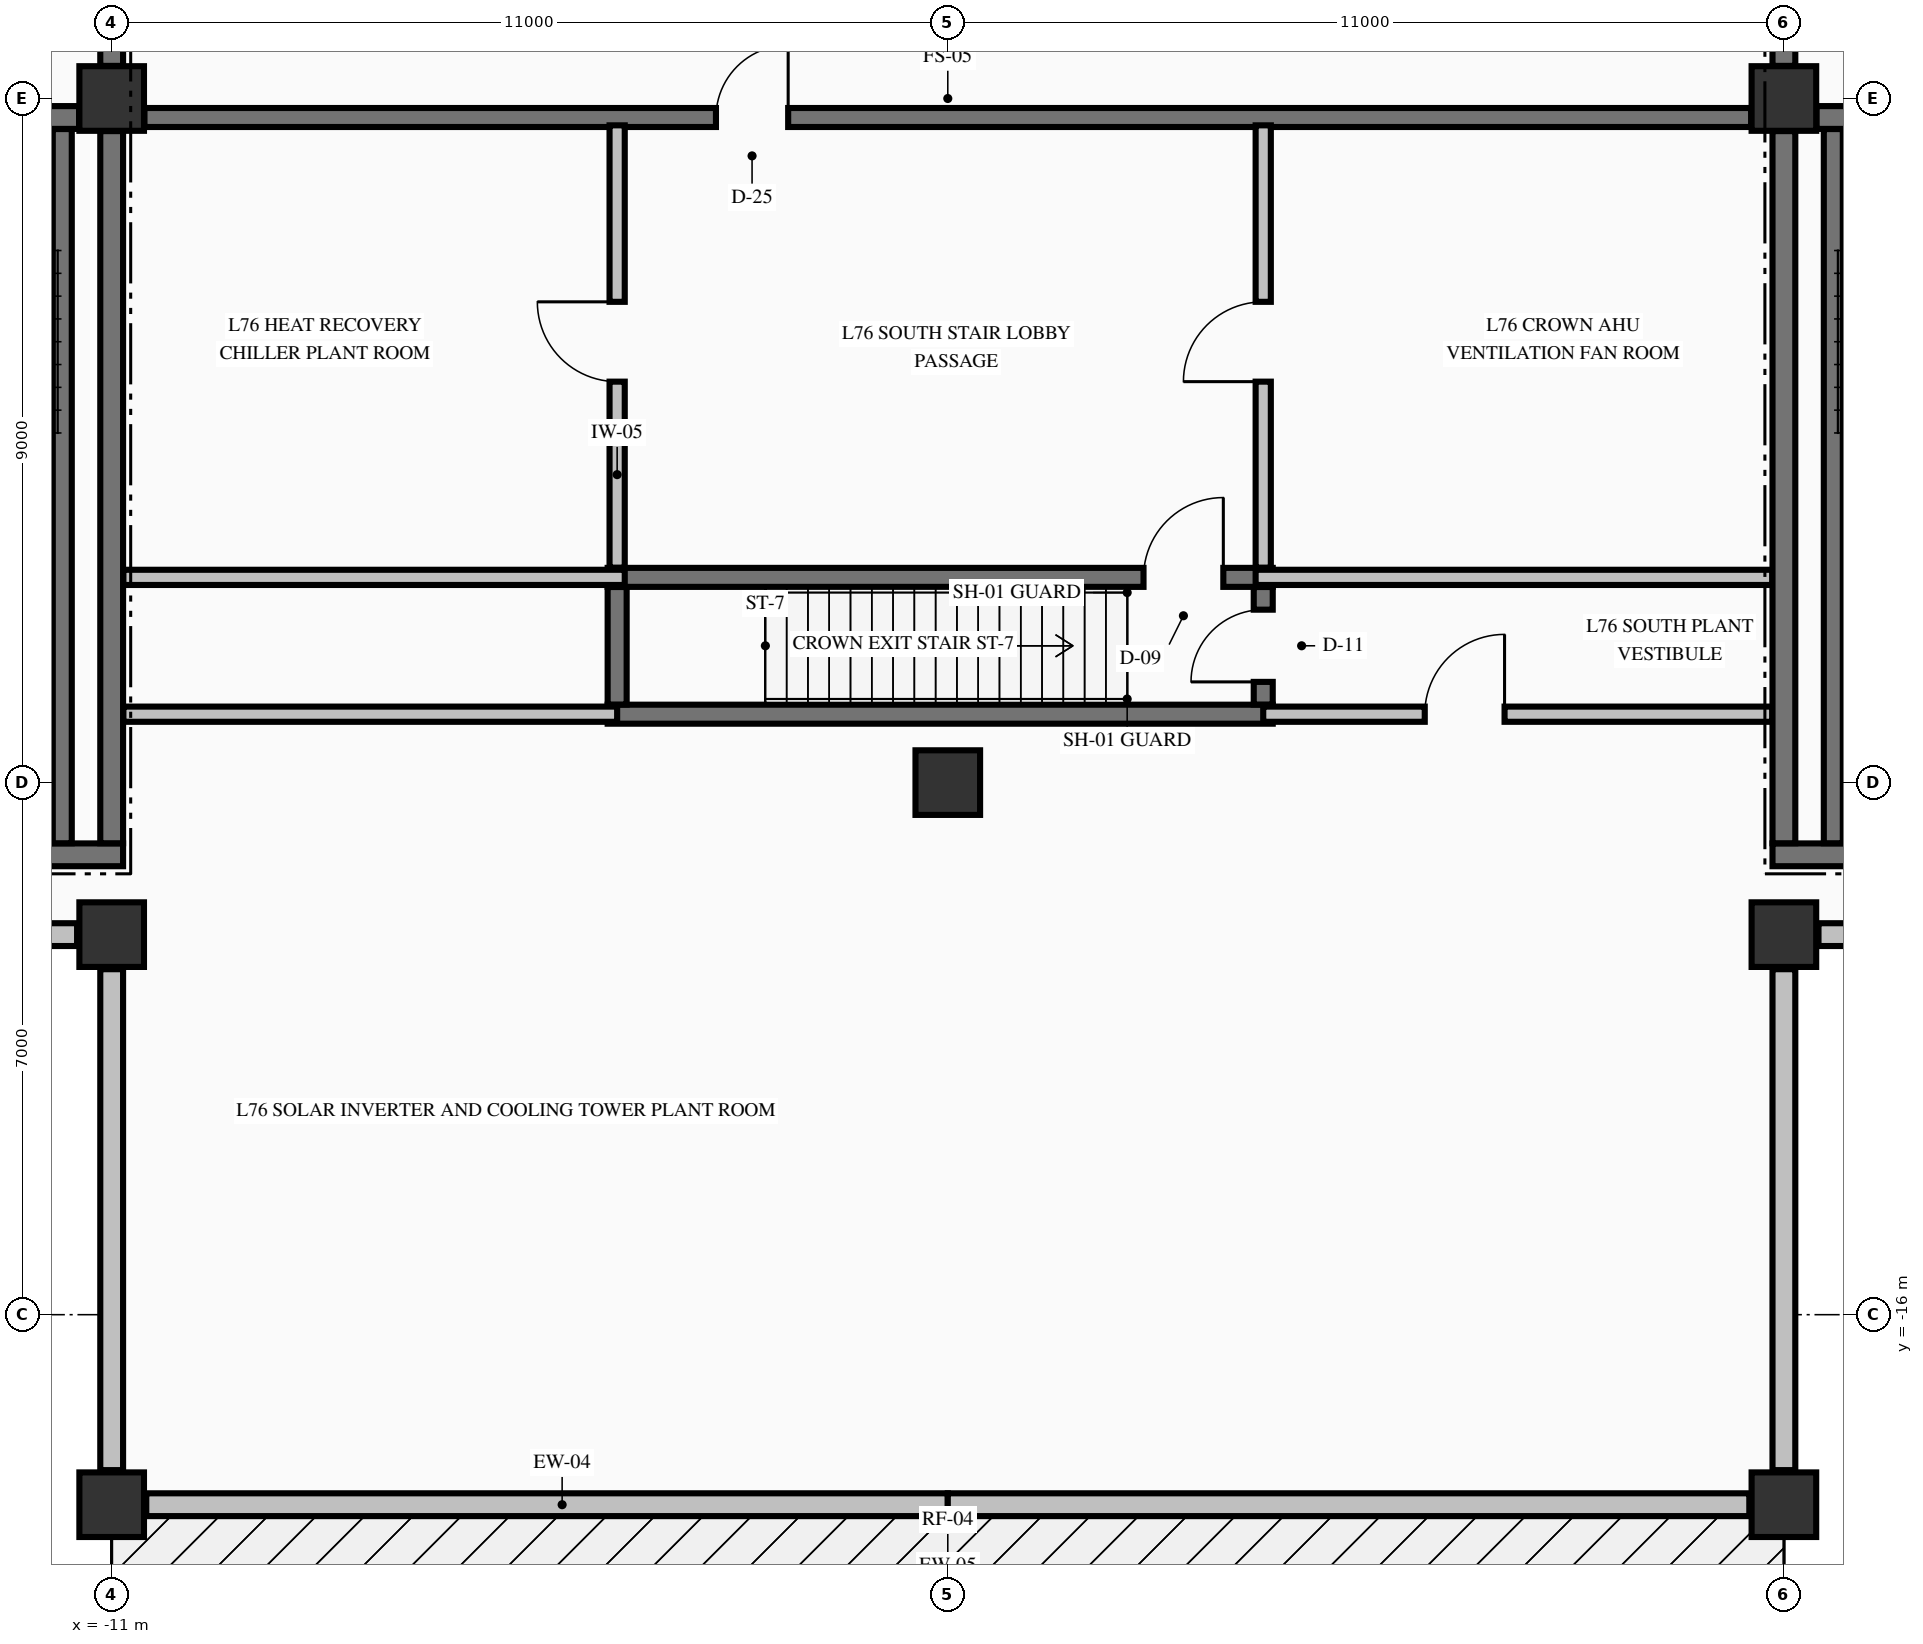
"""IFC4 building model, lengths in metres.
Left out: names, types, materials, properties, quantities, classifications, styles, units other than length and angle.
Written with IfcOpenShell. Run it as: python <this file> out.ifc"""

import sys

from ifc_helpers import new_model, si_unit, direction, frame, frame_2d, origin, origin_2d, place, context, subcontext, project, spatial, rectangle, extrude, element, fill, save


model = new_model("IFC4")
c1 = context("Model", 3, precision=1e-05, world=origin(), true_north=direction((0.0, 1.0)))
c2 = subcontext(c1, "Body", "Model", "MODEL_VIEW")
j1 = project(units=[si_unit("LENGTHUNIT", "METRE"), si_unit("PLANEANGLEUNIT", "RADIAN")], contexts=[c1])
p1 = place(None, origin())
s1 = spatial("IfcSite", under=j1, at=p1, CompositionType="ELEMENT")
p2 = place(p1, origin())
s2 = spatial("IfcBuilding", under=s1, at=p2, CompositionType="ELEMENT")
p3 = place(p2, frame((0.0, 0.0, 284.86)))
s3 = spatial("IfcBuildingStorey", under=s2, at=p3, CompositionType="ELEMENT", Elevation=284.86)
for number, where, z_axis, x_axis in (
    (1, (-11.0, -18.5, -0.325), (0.0, 0.0, 1.0), (1.0, 0.0, 0.0)),
    (2, (11.0, -18.5, -0.325), (0.0, 0.0, 1.0), (1.0, 0.0, 0.0)),
    (3, (-11.0, -11.0, -0.325), (0.0, 0.0, 1.0), (1.0, 0.0, 0.0)),
    (4, (11.0, -11.0, -0.325), (0.0, 0.0, 1.0), (1.0, 0.0, 0.0)),
    (5, (-11.0, 0.0, -0.325), (0.0, 0.0, 1.0), (1.0, 0.0, 0.0)),
    (6, (11.0, 0.0, -0.325), (0.0, 0.0, 1.0), (1.0, 0.0, 0.0)),
    (7, (0.0, -9.0, -0.325), (0.0, 0.0, 1.0), (1.0, 0.0, 0.0)),
):
    element("IfcColumn", number, at=place(p3, frame(where, z_axis=z_axis, x_axis=x_axis)), inside=s3, PredefinedType="COLUMN", context=c2, shape_type="SweptSolid", body=[
        extrude(rectangle(XDim=0.85, YDim=0.85, at=origin_2d()), origin(), (0.0, 0.0, 1.0), 3.06),
    ])
for number, where, z_axis, x_axis in (
    (8, (-10.545, -18.5, 0.0), (0.0, 0.0, 1.0), (1.0, 0.0, 0.0)),
    (9, (0.0, -18.5, 0.0), (0.0, 0.0, 1.0), (1.0, 0.0, 0.0)),
):
    element("IfcWall", number, at=place(p3, frame(where, z_axis=z_axis, x_axis=x_axis)), inside=s3, PredefinedType="STANDARD", context=c2, shape_type="SweptSolid", body=[
        extrude(rectangle(XDim=10.545, YDim=0.3, at=frame_2d((5.272, 0.0))), origin(), (0.0, 0.0, 1.0), 2.127),
    ])
p4 = place(p3, frame((11.0, -18.045, 0.0), z_axis=(0.0, 0.0, 1.0), x_axis=(0.0, 1.0, 0.0)))
e10 = element("IfcWall", 10, at=p4, inside=s3, PredefinedType="STANDARD", context=c2, shape_type="SweptSolid", body=[
    extrude(rectangle(XDim=6.59, YDim=0.3, at=frame_2d((3.295, 0.0))), origin(), (0.0, 0.0, 1.0), 0.927),
])
for number, where, z_axis, x_axis in (
    (11, (11.455, -11.0, 0.0), (0.0, 0.0, 1.0), (1.0, 0.0, 0.0)),
    (12, (-18.045, -11.0, 0.0), (0.0, 0.0, 1.0), (1.0, 0.0, 0.0)),
):
    element("IfcWall", number, at=place(p3, frame(where, z_axis=z_axis, x_axis=x_axis)), inside=s3, PredefinedType="STANDARD", context=c2, shape_type="SweptSolid", body=[
        extrude(rectangle(XDim=6.59, YDim=0.3, at=frame_2d((3.295, 0.0))), origin(), (0.0, 0.0, 1.0), 1.077),
    ])
p5 = place(p3, frame((-11.0, -11.455, 0.0), z_axis=(0.0, 0.0, 1.0), x_axis=(0.0, -1.0, 0.0)))
e13 = element("IfcWall", 13, at=p5, inside=s3, PredefinedType="STANDARD", context=c2, shape_type="SweptSolid", body=[
    extrude(rectangle(XDim=6.59, YDim=0.3, at=frame_2d((3.295, 0.0))), origin(), (0.0, 0.0, 1.0), 0.927),
])
for number, where, z_axis, x_axis in (
    (14, (-14.85, -9.95, 0.0), (0.0, 0.0, 1.0), (1.0, 0.0, 0.0)),
    (15, (10.85, -9.95, 0.0), (0.0, 0.0, 1.0), (1.0, 0.0, 0.0)),
):
    element("IfcWall", number, at=place(p3, frame(where, z_axis=z_axis, x_axis=x_axis)), inside=s3, PredefinedType="SHEAR", context=c2, shape_type="SweptSolid", body=[
        extrude(rectangle(XDim=4.0, YDim=0.3, at=frame_2d((2.0, 0.0))), origin(), (0.0, 0.0, 1.0), 2.735),
    ])
p6 = place(p3, frame((-4.475, -8.1, 0.0), z_axis=(0.0, 0.0, 1.0), x_axis=(1.0, 0.0, 0.0)))
e16 = element("IfcWall", 16, at=p6, inside=s3, PredefinedType="SOLIDWALL", context=c2, shape_type="SweptSolid", body=[
    extrude(rectangle(XDim=8.75, YDim=0.25, at=frame_2d((4.375, 0.0))), origin(), (0.0, 0.0, 1.0), 2.735),
])
p7 = place(p3, frame((-4.475, -6.3, 0.0), z_axis=(0.0, 0.0, 1.0), x_axis=(1.0, 0.0, 0.0)))
e17 = element("IfcWall", 17, at=p7, inside=s3, PredefinedType="SOLIDWALL", context=c2, shape_type="SweptSolid", body=[
    extrude(rectangle(XDim=8.75, YDim=0.25, at=frame_2d((4.375, 0.0))), origin(), (0.0, 0.0, 1.0), 2.735),
])
p8 = place(p7, frame((7.05, 0.0, 0.0)))
e18 = element("IfcOpeningElement", 18, at=p8, cuts=e17, PredefinedType="OPENING", context=c2, shape_type="SweptSolid", body=[
    extrude(rectangle(XDim=1.05, YDim=2.15, at=frame_2d((0.525, 1.075))), frame((0.0, 0.135, 0.0), z_axis=(0.0, -1.0, 0.0), x_axis=(1.0, 0.0, 0.0)), (0.0, 0.0, 1.0), 0.27),
])
p9 = place(p3, frame((-14.85, -0.25, 0.0), z_axis=(0.0, 0.0, 1.0), x_axis=(1.0, 0.0, 0.0)))
e19 = element("IfcWall", 19, at=p9, inside=s3, PredefinedType="SHEAR", context=c2, shape_type="SweptSolid", body=[
    extrude(rectangle(XDim=3.421, YDim=0.3, at=frame_2d((1.71, 0.0))), origin(), (0.0, 0.0, 1.0), 2.735),
])
p10 = place(p9, frame((1.15, 0.0, 0.0)))
e20 = element("IfcOpeningElement", 20, at=p10, cuts=e19, PredefinedType="OPENING", context=c2, shape_type="SweptSolid", body=[
    extrude(rectangle(XDim=1.1, YDim=2.15, at=frame_2d((0.55, 1.075))), frame((0.0, 0.16, 0.0), z_axis=(0.0, -1.0, 0.0), x_axis=(1.0, 0.0, 0.0)), (0.0, 0.0, 1.0), 0.32),
])
p11 = place(p3, frame((11.429, -0.25, 0.0), z_axis=(0.0, 0.0, 1.0), x_axis=(1.0, 0.0, 0.0)))
e21 = element("IfcWall", 21, at=p11, inside=s3, PredefinedType="SHEAR", context=c2, shape_type="SweptSolid", body=[
    extrude(rectangle(XDim=3.421, YDim=0.3, at=frame_2d((1.71, 0.0))), origin(), (0.0, 0.0, 1.0), 2.735),
])
p12 = place(p11, frame((1.171, 0.0, 0.0)))
e22 = element("IfcOpeningElement", 22, at=p12, cuts=e21, PredefinedType="OPENING", context=c2, shape_type="SweptSolid", body=[
    extrude(rectangle(XDim=1.1, YDim=2.15, at=frame_2d((0.55, 1.075))), frame((0.0, 0.16, 0.0), z_axis=(0.0, -1.0, 0.0), x_axis=(1.0, 0.0, 0.0)), (0.0, 0.0, 1.0), 0.32),
])
p13 = place(p3, frame((-10.847, -8.1, 0.0), z_axis=(0.0, 0.0, 1.0), x_axis=(1.0, 0.0, 0.0)))
e23 = element("IfcWall", 23, at=p13, inside=s3, PredefinedType="PARTITIONING", context=c2, shape_type="SweptSolid", body=[
    extrude(rectangle(XDim=6.497, YDim=0.2, at=frame_2d((3.249, 0.0))), origin(), (0.0, 0.0, 1.0), 2.735),
])
p14 = place(p3, frame((4.15, -8.1, 0.0), z_axis=(0.0, 0.0, 1.0), x_axis=(1.0, 0.0, 0.0)))
e24 = element("IfcWall", 24, at=p14, inside=s3, PredefinedType="PARTITIONING", context=c2, shape_type="SweptSolid", body=[
    extrude(rectangle(XDim=6.697, YDim=0.2, at=frame_2d((3.349, 0.0))), origin(), (0.0, 0.0, 1.0), 2.735),
])
p15 = place(p14, frame((2.125, 0.0, 0.0)))
e25 = element("IfcOpeningElement", 25, at=p15, cuts=e24, PredefinedType="OPENING", context=c2, shape_type="SweptSolid", body=[
    extrude(rectangle(XDim=1.05, YDim=2.15, at=frame_2d((0.525, 1.075))), frame((0.0, 0.11, 0.0), z_axis=(0.0, -1.0, 0.0), x_axis=(1.0, 0.0, 0.0)), (0.0, 0.0, 1.0), 0.22),
])
p16 = place(p3, frame((-10.847, -6.3, 0.0), z_axis=(0.0, 0.0, 1.0), x_axis=(1.0, 0.0, 0.0)))
e26 = element("IfcWall", 26, at=p16, inside=s3, PredefinedType="PARTITIONING", context=c2, shape_type="SweptSolid", body=[
    extrude(rectangle(XDim=6.597, YDim=0.2, at=frame_2d((3.298, 0.0))), origin(), (0.0, 0.0, 1.0), 2.735),
])
p17 = place(p3, frame((4.05, -6.3, 0.0), z_axis=(0.0, 0.0, 1.0), x_axis=(1.0, 0.0, 0.0)))
e27 = element("IfcWall", 27, at=p17, inside=s3, PredefinedType="PARTITIONING", context=c2, shape_type="SweptSolid", body=[
    extrude(rectangle(XDim=6.797, YDim=0.2, at=frame_2d((3.398, 0.0))), origin(), (0.0, 0.0, 1.0), 2.735),
])
p18 = place(p3, frame((-10.569, -0.25, 0.0), z_axis=(0.0, 0.0, 1.0), x_axis=(1.0, 0.0, 0.0)))
e28 = element("IfcWall", 28, at=p18, inside=s3, PredefinedType="SOLIDWALL", context=c2, shape_type="SweptSolid", body=[
    extrude(rectangle(XDim=21.138, YDim=0.25, at=frame_2d((10.569, 0.0))), origin(), (0.0, 0.0, 1.0), 2.735),
])
p19 = place(p18, frame((7.519, 0.0, 0.0)))
e29 = element("IfcOpeningElement", 29, at=p19, cuts=e28, PredefinedType="OPENING", context=c2, shape_type="SweptSolid", body=[
    extrude(rectangle(XDim=0.95, YDim=2.02, at=frame_2d((0.475, 1.01))), frame((0.0, 0.135, 0.0), z_axis=(0.0, -1.0, 0.0), x_axis=(1.0, 0.0, 0.0)), (0.0, 0.0, 1.0), 0.27),
])
p20 = place(p3, frame((-11.65, -9.798, 0.0), z_axis=(0.0, 0.0, 1.0), x_axis=(0.0, 1.0, 0.0)))
e30 = element("IfcWall", 30, at=p20, inside=s3, PredefinedType="SOLIDWALL", context=c2, shape_type="SweptSolid", body=[
    extrude(rectangle(XDim=9.396, YDim=0.25, at=frame_2d((4.698, 0.0))), origin(), (0.0, 0.0, 1.0), 2.735),
])
p21 = place(p3, frame((-11.0, -9.798, 0.0), z_axis=(0.0, 0.0, 1.0), x_axis=(0.0, 1.0, 0.0)))
e31 = element("IfcWall", 31, at=p21, inside=s3, PredefinedType="SHEAR", context=c2, shape_type="SweptSolid", body=[
    extrude(rectangle(XDim=9.369, YDim=0.3, at=frame_2d((4.685, 0.0))), origin(), (0.0, 0.0, 1.0), 2.735),
])
p22 = place(p3, frame((-11.0, 0.429, 0.0), z_axis=(0.0, 0.0, 1.0), x_axis=(0.0, 1.0, 0.0)))
e32 = element("IfcWall", 32, at=p22, inside=s3, PredefinedType="SHEAR", context=c2, shape_type="SweptSolid", body=[
    extrude(rectangle(XDim=2.319, YDim=0.3, at=frame_2d((1.16, 0.0))), origin(), (0.0, 0.0, 1.0), 2.735),
])
p23 = place(p22, frame((0.671, 0.0, 0.0)))
e33 = element("IfcOpeningElement", 33, at=p23, cuts=e32, PredefinedType="OPENING", context=c2, shape_type="SweptSolid", body=[
    extrude(rectangle(XDim=1.1, YDim=2.15, at=frame_2d((0.55, 1.075))), frame((0.0, 0.16, 0.0), z_axis=(0.0, -1.0, 0.0), x_axis=(1.0, 0.0, 0.0)), (0.0, 0.0, 1.0), 0.32),
])
p24 = place(p3, frame((-4.35, -7.973, 0.0), z_axis=(0.0, 0.0, 1.0), x_axis=(0.0, 1.0, 0.0)))
e34 = element("IfcWall", 34, at=p24, inside=s3, PredefinedType="SOLIDWALL", context=c2, shape_type="SweptSolid", body=[
    extrude(rectangle(XDim=1.546, YDim=0.25, at=frame_2d((0.773, 0.0))), origin(), (0.0, 0.0, 1.0), 2.735),
])
p25 = place(p3, frame((4.15, -7.973, 0.0), z_axis=(0.0, 0.0, 1.0), x_axis=(0.0, 1.0, 0.0)))
e35 = element("IfcWall", 35, at=p25, inside=s3, PredefinedType="SOLIDWALL", context=c2, shape_type="SweptSolid", body=[
    extrude(rectangle(XDim=1.546, YDim=0.25, at=frame_2d((0.773, 0.0))), origin(), (0.0, 0.0, 1.0), 2.735),
])
p26 = place(p25, frame((0.298, 0.0, 0.0)))
e36 = element("IfcOpeningElement", 36, at=p26, cuts=e35, PredefinedType="OPENING", context=c2, shape_type="SweptSolid", body=[
    extrude(rectangle(XDim=0.95, YDim=2.15, at=frame_2d((0.475, 1.075))), frame((0.0, 0.135, 0.0), z_axis=(0.0, -1.0, 0.0), x_axis=(1.0, 0.0, 0.0)), (0.0, 0.0, 1.0), 0.27),
])
p27 = place(p3, frame((11.0, -9.798, 0.0), z_axis=(0.0, 0.0, 1.0), x_axis=(0.0, 1.0, 0.0)))
e37 = element("IfcWall", 37, at=p27, inside=s3, PredefinedType="SHEAR", context=c2, shape_type="SweptSolid", body=[
    extrude(rectangle(XDim=9.369, YDim=0.3, at=frame_2d((4.685, 0.0))), origin(), (0.0, 0.0, 1.0), 2.735),
])
p28 = place(p3, frame((11.0, 0.429, 0.0), z_axis=(0.0, 0.0, 1.0), x_axis=(0.0, 1.0, 0.0)))
e38 = element("IfcWall", 38, at=p28, inside=s3, PredefinedType="SHEAR", context=c2, shape_type="SweptSolid", body=[
    extrude(rectangle(XDim=2.319, YDim=0.3, at=frame_2d((1.16, 0.0))), origin(), (0.0, 0.0, 1.0), 2.735),
])
p29 = place(p28, frame((0.671, 0.0, 0.0)))
e39 = element("IfcOpeningElement", 39, at=p29, cuts=e38, PredefinedType="OPENING", context=c2, shape_type="SweptSolid", body=[
    extrude(rectangle(XDim=1.1, YDim=2.15, at=frame_2d((0.55, 1.075))), frame((0.0, 0.16, 0.0), z_axis=(0.0, -1.0, 0.0), x_axis=(1.0, 0.0, 0.0)), (0.0, 0.0, 1.0), 0.32),
])
p30 = place(p3, frame((11.65, -9.798, 0.0), z_axis=(0.0, 0.0, 1.0), x_axis=(0.0, 1.0, 0.0)))
e40 = element("IfcWall", 40, at=p30, inside=s3, PredefinedType="SOLIDWALL", context=c2, shape_type="SweptSolid", body=[
    extrude(rectangle(XDim=9.396, YDim=0.25, at=frame_2d((4.698, 0.0))), origin(), (0.0, 0.0, 1.0), 2.735),
])
p31 = place(p3, frame((-4.35, -6.172, 0.0), z_axis=(0.0, 0.0, 1.0), x_axis=(0.0, 1.0, 0.0)))
e41 = element("IfcWall", 41, at=p31, inside=s3, PredefinedType="PARTITIONING", context=c2, shape_type="SweptSolid", body=[
    extrude(rectangle(XDim=5.819, YDim=0.2, at=frame_2d((2.91, 0.0))), origin(), (0.0, 0.0, 1.0), 2.735),
])
p32 = place(p31, frame((2.447, 0.0, 0.0)))
e42 = element("IfcOpeningElement", 42, at=p32, cuts=e41, PredefinedType="OPENING", context=c2, shape_type="SweptSolid", body=[
    extrude(rectangle(XDim=1.05, YDim=2.15, at=frame_2d((0.525, 1.075))), frame((0.0, 0.11, 0.0), z_axis=(0.0, -1.0, 0.0), x_axis=(1.0, 0.0, 0.0)), (0.0, 0.0, 1.0), 0.22),
])
p33 = place(p3, frame((4.15, -6.172, 0.0), z_axis=(0.0, 0.0, 1.0), x_axis=(0.0, 1.0, 0.0)))
e43 = element("IfcWall", 43, at=p33, inside=s3, PredefinedType="PARTITIONING", context=c2, shape_type="SweptSolid", body=[
    extrude(rectangle(XDim=5.819, YDim=0.2, at=frame_2d((2.91, 0.0))), origin(), (0.0, 0.0, 1.0), 2.735),
])
p34 = place(p33, frame((2.447, 0.0, 0.0)))
e44 = element("IfcOpeningElement", 44, at=p34, cuts=e43, PredefinedType="OPENING", context=c2, shape_type="SweptSolid", body=[
    extrude(rectangle(XDim=1.05, YDim=2.15, at=frame_2d((0.525, 1.075))), frame((0.0, 0.11, 0.0), z_axis=(0.0, -1.0, 0.0), x_axis=(1.0, 0.0, 0.0)), (0.0, 0.0, 1.0), 0.22),
])
p35 = place(p8, origin())
e45 = element("IfcDoor", 45, at=p35, inside=s3, OperationType="SINGLE_SWING_RIGHT", PredefinedType="DOOR", context=c2, shape_type="SweptSolid", body=[
    extrude(rectangle(XDim=1.05, YDim=2.15, at=frame_2d((0.525, 1.075))), frame((0.0, 0.025, 0.0), z_axis=(0.0, -1.0, 0.0), x_axis=(1.0, 0.0, 0.0)), (0.0, 0.0, 1.0), 0.05),
])
fill(e18, e45)
p36 = place(p19, origin())
e46 = element("IfcDoor", 46, at=p36, inside=s3, OperationType="SINGLE_SWING_RIGHT", PredefinedType="DOOR", context=c2, shape_type="SweptSolid", body=[
    extrude(rectangle(XDim=0.95, YDim=2.02, at=frame_2d((0.475, 1.01))), frame((0.0, 0.025, 0.0), z_axis=(0.0, -1.0, 0.0), x_axis=(1.0, 0.0, 0.0)), (0.0, 0.0, 1.0), 0.05),
])
fill(e29, e46)
p37 = place(p32, origin())
e47 = element("IfcDoor", 47, at=p37, inside=s3, OperationType="SINGLE_SWING_RIGHT", PredefinedType="DOOR", context=c2, shape_type="SweptSolid", body=[
    extrude(rectangle(XDim=1.05, YDim=2.15, at=frame_2d((0.525, 1.075))), frame((0.0, 0.025, 0.0), z_axis=(0.0, -1.0, 0.0), x_axis=(1.0, 0.0, 0.0)), (0.0, 0.0, 1.0), 0.05),
])
fill(e42, e47)
p38 = place(p34, origin())
e48 = element("IfcDoor", 48, at=p38, inside=s3, OperationType="SINGLE_SWING_LEFT", PredefinedType="DOOR", context=c2, shape_type="SweptSolid", body=[
    extrude(rectangle(XDim=1.05, YDim=2.15, at=frame_2d((0.525, 1.075))), frame((0.0, 0.025, 0.0), z_axis=(0.0, -1.0, 0.0), x_axis=(1.0, 0.0, 0.0)), (0.0, 0.0, 1.0), 0.05),
])
fill(e44, e48)
p39 = place(p26, origin())
e49 = element("IfcDoor", 49, at=p39, inside=s3, OperationType="SINGLE_SWING_LEFT", PredefinedType="DOOR", context=c2, shape_type="SweptSolid", body=[
    extrude(rectangle(XDim=0.95, YDim=2.15, at=frame_2d((0.475, 1.075))), frame((0.0, 0.025, 0.0), z_axis=(0.0, -1.0, 0.0), x_axis=(1.0, 0.0, 0.0)), (0.0, 0.0, 1.0), 0.05),
])
fill(e36, e49)
p40 = place(p15, origin())
e50 = element("IfcDoor", 50, at=p40, inside=s3, OperationType="SINGLE_SWING_RIGHT", PredefinedType="DOOR", context=c2, shape_type="SweptSolid", body=[
    extrude(rectangle(XDim=1.05, YDim=2.15, at=frame_2d((0.525, 1.075))), frame((0.0, 0.025, 0.0), z_axis=(0.0, -1.0, 0.0), x_axis=(1.0, 0.0, 0.0)), (0.0, 0.0, 1.0), 0.05),
])
fill(e25, e50)
save(model, sys.argv[1])
